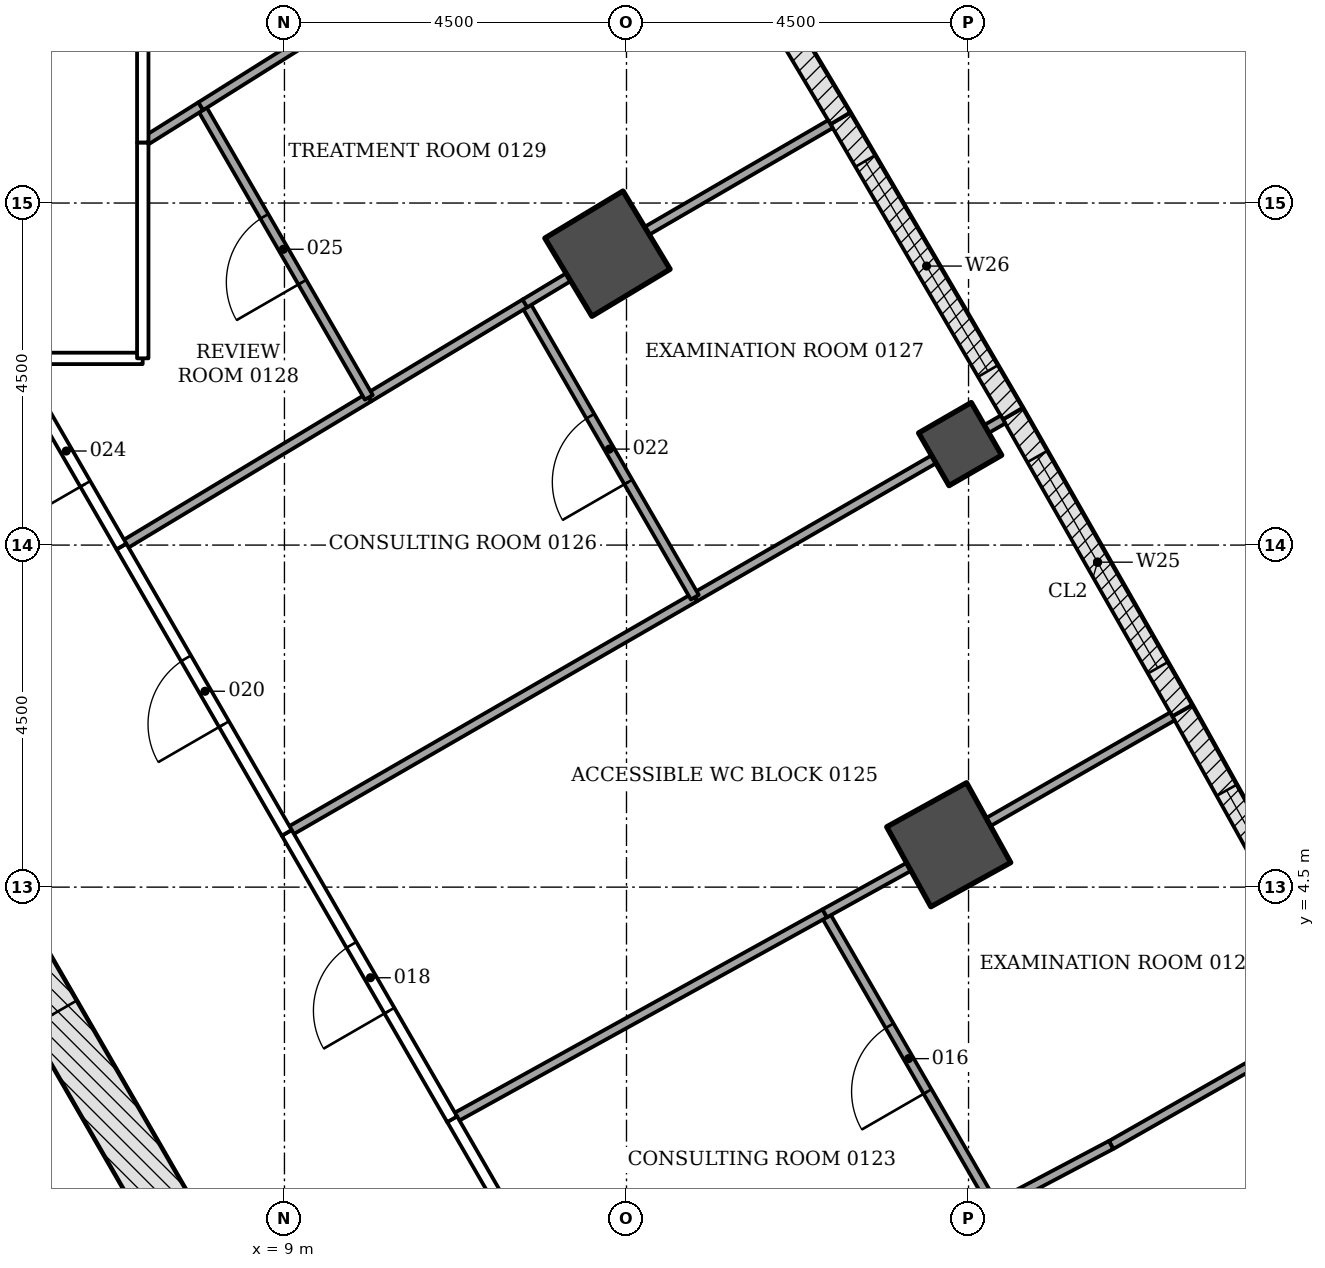
"""IFC4 building model, lengths in metres.
Left out: names, types, materials, properties, quantities, classifications, styles, units other than length and angle.
Written with IfcOpenShell. Run it as: python <this file> out.ifc"""

import sys

from ifc_helpers import new_model, si_unit, direction, frame, frame_2d, origin, origin_2d, place, context, subcontext, project, spatial, rectangle, extrude, element, fill, save


model = new_model("IFC4")
c1 = context("Model", 3, precision=1e-05, world=origin(), true_north=direction((0.0, 1.0)))
c2 = subcontext(c1, "Body", "Model", "MODEL_VIEW")
j1 = project(units=[si_unit("LENGTHUNIT", "METRE"), si_unit("PLANEANGLEUNIT", "RADIAN")], contexts=[c1])
p1 = place(None, origin())
s1 = spatial("IfcSite", under=j1, at=p1, CompositionType="ELEMENT")
p2 = place(p1, origin())
s2 = spatial("IfcBuilding", under=s1, at=p2, CompositionType="ELEMENT")
p3 = place(p2, frame((0.0, 0.0, 6.0)))
s3 = spatial("IfcBuildingStorey", under=s2, at=p3, CompositionType="ELEMENT", Elevation=6.0)
for number, where, z_axis, x_axis in (
    (1, (17.739, 5.058, -0.25), (0.0, 0.0, 1.0), (0.875, 0.484, 0.0)),
    (2, (13.25, 12.834, -0.25), (0.0, 0.0, 1.0), (0.857, 0.516, 0.0)),
):
    element("IfcColumn", number, at=place(p3, frame(where, z_axis=z_axis, x_axis=x_axis)), inside=s3, PredefinedType="COLUMN", context=c2, shape_type="SweptSolid", body=[
        extrude(rectangle(XDim=1.2, YDim=1.2, at=origin_2d()), origin(), (0.0, 0.0, 1.0), 4.5),
    ])
p4 = place(p3, frame((17.89, 10.329, -0.25), z_axis=(0.0, 0.0, 1.0), x_axis=(0.866025403784, 0.5, 0.0)))
e3 = element("IfcColumn", 3, at=p4, inside=s3, PredefinedType="COLUMN", context=c2, shape_type="SweptSolid", body=[
    extrude(rectangle(XDim=0.8, YDim=0.8, at=origin_2d()), origin(), (0.0, 0.0, 1.0), 4.5),
])
p5 = place(p3, frame((10.311, -4.703, -0.25), z_axis=(0.0, 0.0, 1.0), x_axis=(-0.500001446645, 0.866024568562, 0.0)))
e4 = element("IfcWall", 4, at=p5, inside=s3, PredefinedType="SHEAR", context=c2, shape_type="SweptSolid", body=[
    extrude(rectangle(XDim=18.458, YDim=0.7, at=frame_2d((9.229, 0.0))), origin(), (0.0, 0.0, 1.0), 4.5),
])
p6 = place(p5, frame((8.7, 0.0, 0.25)))
e5 = element("IfcOpeningElement", 5, at=p6, cuts=e4, PredefinedType="OPENING", context=c2, shape_type="SweptSolid", body=[
    extrude(rectangle(XDim=1.0, YDim=2.1, at=frame_2d((0.5, 1.05))), frame((0.0, 0.36, 0.0), z_axis=(0.0, -1.0, 0.0), x_axis=(1.0, 0.0, 0.0)), (0.0, 0.0, 1.0), 0.72),
])
p7 = place(p5, frame((4.002, 0.0, 0.25)))
e6 = element("IfcOpeningElement", 6, at=p7, cuts=e4, PredefinedType="OPENING", context=c2, shape_type="SweptSolid", body=[
    extrude(rectangle(XDim=0.9, YDim=2.1, at=frame_2d((0.45, 1.05))), frame((0.0, 0.36, 0.0), z_axis=(0.0, -1.0, 0.0), x_axis=(1.0, 0.0, 0.0)), (0.0, 0.0, 1.0), 0.72),
])
p8 = place(p5, frame((14.093, 0.0, 0.25)))
e7 = element("IfcOpeningElement", 7, at=p8, cuts=e4, PredefinedType="OPENING", context=c2, shape_type="SweptSolid", body=[
    extrude(rectangle(XDim=0.9, YDim=2.1, at=frame_2d((0.45, 1.05))), frame((0.0, 0.36, 0.0), z_axis=(0.0, -1.0, 0.0), x_axis=(1.0, 0.0, 0.0)), (0.0, 0.0, 1.0), 0.72),
])
p9 = place(p3, frame((20.812, 6.82, 0.0), z_axis=(0.0, 0.0, 1.0), x_axis=(0.486606252415, -0.873621402617, 0.0)))
e8 = element("IfcWall", 8, at=p9, inside=s3, PredefinedType="NOTDEFINED", context=c2, shape_type="SweptSolid", body=[
    extrude(rectangle(XDim=4.496, YDim=0.3, at=frame_2d((2.248, 0.0))), origin(), (0.0, 0.0, 1.0), 4.25),
])
p10 = place(p9, frame((1.198, 0.0, 0.8)))
e9 = element("IfcOpeningElement", 9, at=p10, cuts=e8, PredefinedType="OPENING", context=c2, shape_type="SweptSolid", body=[
    extrude(rectangle(XDim=2.1, YDim=3.0, at=frame_2d((1.05, 1.5))), frame((0.0, 0.16, 0.0), z_axis=(0.0, -1.0, 0.0), x_axis=(1.0, 0.0, 0.0)), (0.0, 0.0, 1.0), 0.32),
])
p11 = place(p3, frame((18.583, 10.728, 0.0), z_axis=(0.0, 0.0, 1.0), x_axis=(0.495524760411, -0.868593812907, 0.0)))
e10 = element("IfcWall", 10, at=p11, inside=s3, PredefinedType="NOTDEFINED", context=c2, shape_type="SweptSolid", body=[
    extrude(rectangle(XDim=4.496, YDim=0.3, at=frame_2d((2.248, 0.0))), origin(), (0.0, 0.0, 1.0), 4.25),
])
p12 = place(p11, frame((0.648, 0.0, 0.8)))
e11 = element("IfcOpeningElement", 11, at=p12, cuts=e10, PredefinedType="OPENING", context=c2, shape_type="SweptSolid", body=[
    extrude(rectangle(XDim=3.2, YDim=2.7, at=frame_2d((1.6, 1.35))), frame((0.0, 0.16, 0.0), z_axis=(0.0, -1.0, 0.0), x_axis=(1.0, 0.0, 0.0)), (0.0, 0.0, 1.0), 0.32),
])
p13 = place(p3, frame((16.314, 14.612, 0.0), z_axis=(0.0, 0.0, 1.0), x_axis=(0.50445499627, -0.86343798662, 0.0)))
e12 = element("IfcWall", 12, at=p13, inside=s3, PredefinedType="NOTDEFINED", context=c2, shape_type="SweptSolid", body=[
    extrude(rectangle(XDim=4.496, YDim=0.3, at=frame_2d((2.248, 0.0))), origin(), (0.0, 0.0, 1.0), 4.25),
])
p14 = place(p13, frame((0.648, 0.0, 0.8)))
e13 = element("IfcOpeningElement", 13, at=p14, cuts=e12, PredefinedType="OPENING", context=c2, shape_type="SweptSolid", body=[
    extrude(rectangle(XDim=3.2, YDim=2.7, at=frame_2d((1.6, 1.35))), frame((0.0, 0.16, 0.0), z_axis=(0.0, -1.0, 0.0), x_axis=(1.0, 0.0, 0.0)), (0.0, 0.0, 1.0), 0.32),
])
p15 = place(p3, frame((14.005, 18.472, 0.0), z_axis=(0.0, 0.0, 1.0), x_axis=(0.513257465408, -0.858234684805, 0.0)))
e14 = element("IfcWall", 14, at=p15, inside=s3, PredefinedType="NOTDEFINED", context=c2, shape_type="SweptSolid", body=[
    extrude(rectangle(XDim=4.496, YDim=0.3, at=frame_2d((2.248, 0.0))), origin(), (0.0, 0.0, 1.0), 4.25),
])
p16 = place(p15, frame((1.198, 0.0, 0.8)))
e15 = element("IfcOpeningElement", 15, at=p16, cuts=e14, PredefinedType="OPENING", context=c2, shape_type="SweptSolid", body=[
    extrude(rectangle(XDim=2.1, YDim=3.0, at=frame_2d((1.05, 1.5))), frame((0.0, 0.16, 0.0), z_axis=(0.0, -1.0, 0.0), x_axis=(1.0, 0.0, 0.0)), (0.0, 0.0, 1.0), 0.32),
])
p17 = place(p3, frame((21.959, 2.295, 0.0), z_axis=(0.0, 0.0, 1.0), x_axis=(-0.868831589773, -0.49510773435, 0.0)))
e16 = element("IfcWall", 16, at=p17, inside=s3, PredefinedType="PARTITIONING", context=c2, shape_type="SweptSolid", body=[
    extrude(rectangle(XDim=2.397, YDim=0.12, at=frame_2d((1.199, 0.0))), origin(), (0.0, 0.0, 1.0), 3.638),
])
p18 = place(p3, frame((19.875, 1.108, 0.0), z_axis=(0.0, 0.0, 1.0), x_axis=(-0.884094940295, -0.467307325584, 0.0)))
e17 = element("IfcWall", 17, at=p18, inside=s3, PredefinedType="PARTITIONING", context=c2, shape_type="SweptSolid", body=[
    extrude(rectangle(XDim=1.74, YDim=0.12, at=frame_2d((0.87, 0.0))), origin(), (0.0, 0.0, 1.0), 3.638),
])
p19 = place(p3, frame((18.336, 0.295, 0.0), z_axis=(0.0, 0.0, 1.0), x_axis=(-0.499992780121, 0.866029572143, 0.0)))
e18 = element("IfcWall", 18, at=p19, inside=s3, PredefinedType="PARTITIONING", context=c2, shape_type="SweptSolid", body=[
    extrude(rectangle(XDim=4.456, YDim=0.12, at=frame_2d((2.228, 0.0))), origin(), (0.0, 0.0, 1.0), 3.638),
])
p20 = place(p19, frame((1.75, 0.0, 0.0)))
e19 = element("IfcOpeningElement", 19, at=p20, cuts=e18, PredefinedType="OPENING", context=c2, shape_type="SweptSolid", body=[
    extrude(rectangle(XDim=1.0, YDim=2.1, at=frame_2d((0.5, 1.05))), frame((0.0, 0.07, 0.0), z_axis=(0.0, -1.0, 0.0), x_axis=(1.0, 0.0, 0.0)), (0.0, 0.0, 1.0), 0.14),
])
p21 = place(p3, frame((11.205, 1.45, 0.0), z_axis=(0.0, 0.0, 1.0), x_axis=(0.50011048, -0.86596160873, 0.0)))
e20 = element("IfcWall", 20, at=p21, inside=s3, PredefinedType="PARTITIONING", context=c2, shape_type="SweptSolid", body=[
    extrude(rectangle(XDim=4.357, YDim=0.15, at=frame_2d((2.178, 0.0))), origin(), (0.0, 0.0, 1.0), 3.638),
])
p22 = place(p21, frame((1.65, 0.0, 0.0)))
e21 = element("IfcOpeningElement", 21, at=p22, cuts=e20, PredefinedType="OPENING", context=c2, shape_type="SweptSolid", body=[
    extrude(rectangle(XDim=1.0, YDim=2.1, at=frame_2d((0.5, 1.05))), frame((0.0, 0.085, 0.0), z_axis=(0.0, -1.0, 0.0), x_axis=(1.0, 0.0, 0.0)), (0.0, 0.0, 1.0), 0.17),
])
p23 = place(p3, frame((16.108, 4.155, 0.0), z_axis=(0.0, 0.0, 1.0), x_axis=(-0.87515505143, -0.483842573526, 0.0)))
e22 = element("IfcWall", 22, at=p23, inside=s3, PredefinedType="PARTITIONING", context=c2, shape_type="SweptSolid", body=[
    extrude(rectangle(XDim=5.599, YDim=0.12, at=frame_2d((2.799, 0.0))), origin(), (0.0, 0.0, 1.0), 3.638),
])
p24 = place(p3, frame((17.214, 4.767, 0.0), z_axis=(0.0, 0.0, 1.0), x_axis=(-0.874994011196, -0.484133742235, 0.0)))
e23 = element("IfcWall", 23, at=p24, inside=s3, PredefinedType="PARTITIONING", context=c2, shape_type="SweptSolid", body=[
    extrude(rectangle(XDim=1.264, YDim=0.12, at=frame_2d((0.632, 0.0))), origin(), (0.0, 0.0, 1.0), 3.638),
])
p25 = place(p3, frame((20.682, 6.746, 0.0), z_axis=(0.0, 0.0, 1.0), x_axis=(-0.867283853893, -0.49781393791, 0.0)))
e24 = element("IfcWall", 24, at=p25, inside=s3, PredefinedType="PARTITIONING", context=c2, shape_type="SweptSolid", body=[
    extrude(rectangle(XDim=2.792, YDim=0.12, at=frame_2d((1.396, 0.0))), origin(), (0.0, 0.0, 1.0), 3.633),
])
p26 = place(p3, frame((11.206, 1.446, 0.0), z_axis=(0.0, 0.0, 1.0), x_axis=(-0.500044734646, 0.865999574684, 0.0)))
e25 = element("IfcWall", 25, at=p26, inside=s3, PredefinedType="PARTITIONING", context=c2, shape_type="SweptSolid", body=[
    extrude(rectangle(XDim=4.35, YDim=0.15, at=frame_2d((2.175, 0.0))), origin(), (0.0, 0.0, 1.0), 3.638),
])
p27 = place(p26, frame((1.65, 0.0, 0.0)))
e26 = element("IfcOpeningElement", 26, at=p27, cuts=e25, PredefinedType="OPENING", context=c2, shape_type="SweptSolid", body=[
    extrude(rectangle(XDim=1.0, YDim=2.1, at=frame_2d((0.5, 1.05))), frame((0.0, 0.085, 0.0), z_axis=(0.0, -1.0, 0.0), x_axis=(1.0, 0.0, 0.0)), (0.0, 0.0, 1.0), 0.17),
])
p28 = place(p3, frame((9.03, 5.215, 0.0), z_axis=(0.0, 0.0, 1.0), x_axis=(-0.500070818246, 0.86598451299, 0.0)))
e27 = element("IfcWall", 27, at=p28, inside=s3, PredefinedType="PARTITIONING", context=c2, shape_type="SweptSolid", body=[
    extrude(rectangle(XDim=4.347, YDim=0.15, at=frame_2d((2.174, 0.0))), origin(), (0.0, 0.0, 1.0), 3.638),
])
p29 = place(p28, frame((1.65, 0.0, 0.0)))
e28 = element("IfcOpeningElement", 28, at=p29, cuts=e27, PredefinedType="OPENING", context=c2, shape_type="SweptSolid", body=[
    extrude(rectangle(XDim=1.0, YDim=2.1, at=frame_2d((0.5, 1.05))), frame((0.0, 0.085, 0.0), z_axis=(0.0, -1.0, 0.0), x_axis=(1.0, 0.0, 0.0)), (0.0, 0.0, 1.0), 0.17),
])
p30 = place(p3, frame((6.855, 8.982, 0.0), z_axis=(0.0, 0.0, 1.0), x_axis=(-0.500176439337, 0.865923512519, 0.0)))
e29 = element("IfcWall", 29, at=p30, inside=s3, PredefinedType="PARTITIONING", context=c2, shape_type="SweptSolid", body=[
    extrude(rectangle(XDim=2.855, YDim=0.15, at=frame_2d((1.427, 0.0))), origin(), (0.0, 0.0, 1.0), 3.638),
])
p31 = place(p30, frame((0.95, 0.0, 0.0)))
e30 = element("IfcOpeningElement", 30, at=p31, cuts=e29, PredefinedType="OPENING", context=c2, shape_type="SweptSolid", body=[
    extrude(rectangle(XDim=1.0, YDim=2.1, at=frame_2d((0.5, 1.05))), frame((0.0, 0.085, 0.0), z_axis=(0.0, -1.0, 0.0), x_axis=(1.0, 0.0, 0.0)), (0.0, 0.0, 1.0), 0.17),
])
p32 = place(p3, frame((5.427, 11.456, 0.0), z_axis=(0.0, 0.0, 1.0), x_axis=(1.0, 0.0, 0.0)))
e31 = element("IfcWall", 31, at=p32, inside=s3, PredefinedType="PARTITIONING", context=c2, shape_type="SweptSolid", body=[
    extrude(rectangle(XDim=1.708, YDim=0.15, at=frame_2d((0.854, 0.0))), origin(), (0.0, 0.0, 1.0), 4.25),
])
p33 = place(p3, frame((7.136, 11.457, 0.0), z_axis=(0.0, 0.0, 1.0), x_axis=(0.0, 1.0, 0.0)))
e32 = element("IfcWall", 32, at=p33, inside=s3, PredefinedType="PARTITIONING", context=c2, shape_type="SweptSolid", body=[
    extrude(rectangle(XDim=2.839, YDim=0.15, at=frame_2d((1.419, 0.0))), origin(), (0.0, 0.0, 1.0), 3.638),
])
p34 = place(p3, frame((7.136, 14.297, 0.0), z_axis=(0.0, 0.0, 1.0), x_axis=(0.0, 1.0, 0.0)))
e33 = element("IfcWall", 33, at=p34, inside=s3, PredefinedType="PARTITIONING", context=c2, shape_type="SweptSolid", body=[
    extrude(rectangle(XDim=5.265, YDim=0.15, at=frame_2d((2.632, 0.0))), origin(), (0.0, 0.0, 1.0), 3.638),
])
p35 = place(p34, frame((2.15, 0.0, 0.0)))
e34 = element("IfcOpeningElement", 34, at=p35, cuts=e33, PredefinedType="OPENING", context=c2, shape_type="SweptSolid", body=[
    extrude(rectangle(XDim=1.0, YDim=2.1, at=frame_2d((0.5, 1.05))), frame((0.0, 0.085, 0.0), z_axis=(0.0, -1.0, 0.0), x_axis=(1.0, 0.0, 0.0)), (0.0, 0.0, 1.0), 0.17),
])
p36 = place(p3, frame((14.4, 8.313, 0.0), z_axis=(0.0, 0.0, 1.0), x_axis=(-0.866114094298, -0.499846352051, 0.0)))
e35 = element("IfcWall", 35, at=p36, inside=s3, PredefinedType="PARTITIONING", context=c2, shape_type="SweptSolid", body=[
    extrude(rectangle(XDim=6.198, YDim=0.12, at=frame_2d((3.099, 0.0))), origin(), (0.0, 0.0, 1.0), 3.638),
])
p37 = place(p3, frame((17.543, 10.128, 0.0), z_axis=(0.0, 0.0, 1.0), x_axis=(-0.866039913117, -0.499974868256, 0.0)))
e36 = element("IfcWall", 36, at=p37, inside=s3, PredefinedType="PARTITIONING", context=c2, shape_type="SweptSolid", body=[
    extrude(rectangle(XDim=3.628, YDim=0.12, at=frame_2d((1.814, 0.0))), origin(), (0.0, 0.0, 1.0), 3.638),
])
p38 = place(p3, frame((18.454, 10.653, 0.0), z_axis=(0.0, 0.0, 1.0), x_axis=(-0.866558586415, -0.499075361355, 0.0)))
e37 = element("IfcWall", 37, at=p38, inside=s3, PredefinedType="PARTITIONING", context=c2, shape_type="SweptSolid", body=[
    extrude(rectangle(XDim=0.25, YDim=0.12, at=frame_2d((0.125, 0.0))), origin(), (0.0, 0.0, 1.0), 4.25),
])
p39 = place(p3, frame((14.399, 8.314, 0.0), z_axis=(0.0, 0.0, 1.0), x_axis=(-0.49998599166, 0.866033491352, 0.0)))
e38 = element("IfcWall", 38, at=p39, inside=s3, PredefinedType="PARTITIONING", context=c2, shape_type="SweptSolid", body=[
    extrude(rectangle(XDim=4.464, YDim=0.12, at=frame_2d((2.232, 0.0))), origin(), (0.0, 0.0, 1.0), 3.638),
])
p40 = place(p39, frame((1.75, 0.0, 0.0)))
e39 = element("IfcOpeningElement", 39, at=p40, cuts=e38, PredefinedType="OPENING", context=c2, shape_type="SweptSolid", body=[
    extrude(rectangle(XDim=1.0, YDim=2.1, at=frame_2d((0.5, 1.05))), frame((0.0, 0.07, 0.0), z_axis=(0.0, -1.0, 0.0), x_axis=(1.0, 0.0, 0.0)), (0.0, 0.0, 1.0), 0.14),
])
p41 = place(p3, frame((10.111, 10.942, 0.0), z_axis=(0.0, 0.0, 1.0), x_axis=(-0.856624092601, -0.515941046996, 0.0)))
e40 = element("IfcWall", 40, at=p41, inside=s3, PredefinedType="PARTITIONING", context=c2, shape_type="SweptSolid", body=[
    extrude(rectangle(XDim=3.799, YDim=0.12, at=frame_2d((1.899, 0.0))), origin(), (0.0, 0.0, 1.0), 3.638),
])
p42 = place(p3, frame((12.171, 12.184, 0.0), z_axis=(0.0, 0.0, 1.0), x_axis=(-0.856451683682, -0.516227191765, 0.0)))
e41 = element("IfcWall", 41, at=p42, inside=s3, PredefinedType="PARTITIONING", context=c2, shape_type="SweptSolid", body=[
    extrude(rectangle(XDim=2.404, YDim=0.12, at=frame_2d((1.202, 0.0))), origin(), (0.0, 0.0, 1.0), 3.638),
])
p43 = place(p3, frame((12.736, 12.524, 0.0), z_axis=(0.0, 0.0, 1.0), x_axis=(-0.856718959006, -0.515783506211, 0.0)))
e42 = element("IfcWall", 42, at=p43, inside=s3, PredefinedType="PARTITIONING", context=c2, shape_type="SweptSolid", body=[
    extrude(rectangle(XDim=0.669, YDim=0.12, at=frame_2d((0.334, 0.0))), origin(), (0.0, 0.0, 1.0), 3.638),
])
p44 = place(p3, frame((16.183, 14.538, 0.0), z_axis=(0.0, 0.0, 1.0), x_axis=(-0.864576979504, -0.50250039454, 0.0)))
e43 = element("IfcWall", 43, at=p44, inside=s3, PredefinedType="PARTITIONING", context=c2, shape_type="SweptSolid", body=[
    extrude(rectangle(XDim=2.792, YDim=0.12, at=frame_2d((1.396, 0.0))), origin(), (0.0, 0.0, 1.0), 3.633),
])
p45 = place(p3, frame((10.11, 10.943, 0.0), z_axis=(0.0, 0.0, 1.0), x_axis=(-0.49990879683, 0.866078053556, 0.0)))
e44 = element("IfcWall", 44, at=p45, inside=s3, PredefinedType="PARTITIONING", context=c2, shape_type="SweptSolid", body=[
    extrude(rectangle(XDim=4.423, YDim=0.12, at=frame_2d((2.211, 0.0))), origin(), (0.0, 0.0, 1.0), 3.638),
])
p46 = place(p45, frame((1.75, 0.0, 0.0)))
e45 = element("IfcOpeningElement", 45, at=p46, cuts=e44, PredefinedType="OPENING", context=c2, shape_type="SweptSolid", body=[
    extrude(rectangle(XDim=1.0, YDim=2.1, at=frame_2d((0.5, 1.05))), frame((0.0, 0.07, 0.0), z_axis=(0.0, -1.0, 0.0), x_axis=(1.0, 0.0, 0.0)), (0.0, 0.0, 1.0), 0.14),
])
p47 = place(p3, frame((7.899, 14.774, 0.0), z_axis=(0.0, 0.0, 1.0), x_axis=(-0.847402109943, -0.530951658877, 0.0)))
e46 = element("IfcWall", 46, at=p47, inside=s3, PredefinedType="PARTITIONING", context=c2, shape_type="SweptSolid", body=[
    extrude(rectangle(XDim=0.898, YDim=0.12, at=frame_2d((0.449, 0.0))), origin(), (0.0, 0.0, 1.0), 3.638),
])
p48 = place(p3, frame((9.17, 15.572, 0.0), z_axis=(0.0, 0.0, 1.0), x_axis=(-0.846881470123, -0.531781699161, 0.0)))
e47 = element("IfcWall", 47, at=p48, inside=s3, PredefinedType="PARTITIONING", context=c2, shape_type="SweptSolid", body=[
    extrude(rectangle(XDim=1.501, YDim=0.12, at=frame_2d((0.75, 0.0))), origin(), (0.0, 0.0, 1.0), 3.638),
])
p49 = place(p10, origin())
e48 = element("IfcWindow", 48, at=p49, inside=s3, PartitioningType="DOUBLE_PANEL_HORIZONTAL", PredefinedType="WINDOW", context=c2, shape_type="SweptSolid", body=[
    extrude(rectangle(XDim=2.1, YDim=3.0, at=frame_2d((1.05, 1.5))), frame((0.0, 0.03, 0.0), z_axis=(0.0, -1.0, 0.0), x_axis=(1.0, 0.0, 0.0)), (0.0, 0.0, 1.0), 0.06),
])
fill(e9, e48)
p50 = place(p12, origin())
e49 = element("IfcWindow", 49, at=p50, inside=s3, PartitioningType="TRIPLE_PANEL_VERTICAL", PredefinedType="WINDOW", context=c2, shape_type="SweptSolid", body=[
    extrude(rectangle(XDim=3.2, YDim=2.7, at=frame_2d((1.6, 1.35))), frame((0.0, 0.03, 0.0), z_axis=(0.0, -1.0, 0.0), x_axis=(1.0, 0.0, 0.0)), (0.0, 0.0, 1.0), 0.06),
])
fill(e11, e49)
p51 = place(p14, origin())
e50 = element("IfcWindow", 50, at=p51, inside=s3, PartitioningType="TRIPLE_PANEL_VERTICAL", PredefinedType="WINDOW", context=c2, shape_type="SweptSolid", body=[
    extrude(rectangle(XDim=3.2, YDim=2.7, at=frame_2d((1.6, 1.35))), frame((0.0, 0.03, 0.0), z_axis=(0.0, -1.0, 0.0), x_axis=(1.0, 0.0, 0.0)), (0.0, 0.0, 1.0), 0.06),
])
fill(e13, e50)
p52 = place(p6, origin())
e51 = element("IfcDoor", 51, at=p52, inside=s3, OperationType="SINGLE_SWING_LEFT", PredefinedType="DOOR", context=c2, shape_type="SweptSolid", body=[
    extrude(rectangle(XDim=1.0, YDim=2.1, at=frame_2d((0.5, 1.05))), frame((0.0, 0.075, 0.0), z_axis=(0.0, -1.0, 0.0), x_axis=(1.0, 0.0, 0.0)), (0.0, 0.0, 1.0), 0.15),
])
fill(e5, e51)
p53 = place(p20, origin())
e52 = element("IfcDoor", 52, at=p53, inside=s3, OperationType="SINGLE_SWING_LEFT", PredefinedType="DOOR", context=c2, shape_type="SweptSolid", body=[
    extrude(rectangle(XDim=1.0, YDim=2.1, at=frame_2d((0.5, 1.05))), frame((0.0, 0.025, 0.0), z_axis=(0.0, -1.0, 0.0), x_axis=(1.0, 0.0, 0.0)), (0.0, 0.0, 1.0), 0.05),
])
fill(e19, e52)
p54 = place(p27, origin())
e53 = element("IfcDoor", 53, at=p54, inside=s3, OperationType="SINGLE_SWING_RIGHT", PredefinedType="DOOR", context=c2, shape_type="SweptSolid", body=[
    extrude(rectangle(XDim=1.0, YDim=2.1, at=frame_2d((0.5, 1.05))), frame((0.0, 0.025, 0.0), z_axis=(0.0, -1.0, 0.0), x_axis=(1.0, 0.0, 0.0)), (0.0, 0.0, 1.0), 0.05),
])
fill(e26, e53)
p55 = place(p29, origin())
e54 = element("IfcDoor", 54, at=p55, inside=s3, OperationType="SINGLE_SWING_RIGHT", PredefinedType="DOOR", context=c2, shape_type="SweptSolid", body=[
    extrude(rectangle(XDim=1.0, YDim=2.1, at=frame_2d((0.5, 1.05))), frame((0.0, 0.025, 0.0), z_axis=(0.0, -1.0, 0.0), x_axis=(1.0, 0.0, 0.0)), (0.0, 0.0, 1.0), 0.05),
])
fill(e28, e54)
p56 = place(p40, origin())
e55 = element("IfcDoor", 55, at=p56, inside=s3, OperationType="SINGLE_SWING_LEFT", PredefinedType="DOOR", context=c2, shape_type="SweptSolid", body=[
    extrude(rectangle(XDim=1.0, YDim=2.1, at=frame_2d((0.5, 1.05))), frame((0.0, 0.025, 0.0), z_axis=(0.0, -1.0, 0.0), x_axis=(1.0, 0.0, 0.0)), (0.0, 0.0, 1.0), 0.05),
])
fill(e39, e55)
p57 = place(p31, origin())
e56 = element("IfcDoor", 56, at=p57, inside=s3, OperationType="SINGLE_SWING_LEFT", PredefinedType="DOOR", context=c2, shape_type="SweptSolid", body=[
    extrude(rectangle(XDim=1.0, YDim=2.1, at=frame_2d((0.5, 1.05))), frame((0.0, 0.025, 0.0), z_axis=(0.0, -1.0, 0.0), x_axis=(1.0, 0.0, 0.0)), (0.0, 0.0, 1.0), 0.05),
])
fill(e30, e56)
p58 = place(p46, origin())
e57 = element("IfcDoor", 57, at=p58, inside=s3, OperationType="SINGLE_SWING_LEFT", PredefinedType="DOOR", context=c2, shape_type="SweptSolid", body=[
    extrude(rectangle(XDim=1.0, YDim=2.1, at=frame_2d((0.5, 1.05))), frame((0.0, 0.025, 0.0), z_axis=(0.0, -1.0, 0.0), x_axis=(1.0, 0.0, 0.0)), (0.0, 0.0, 1.0), 0.05),
])
fill(e45, e57)
save(model, sys.argv[1])
